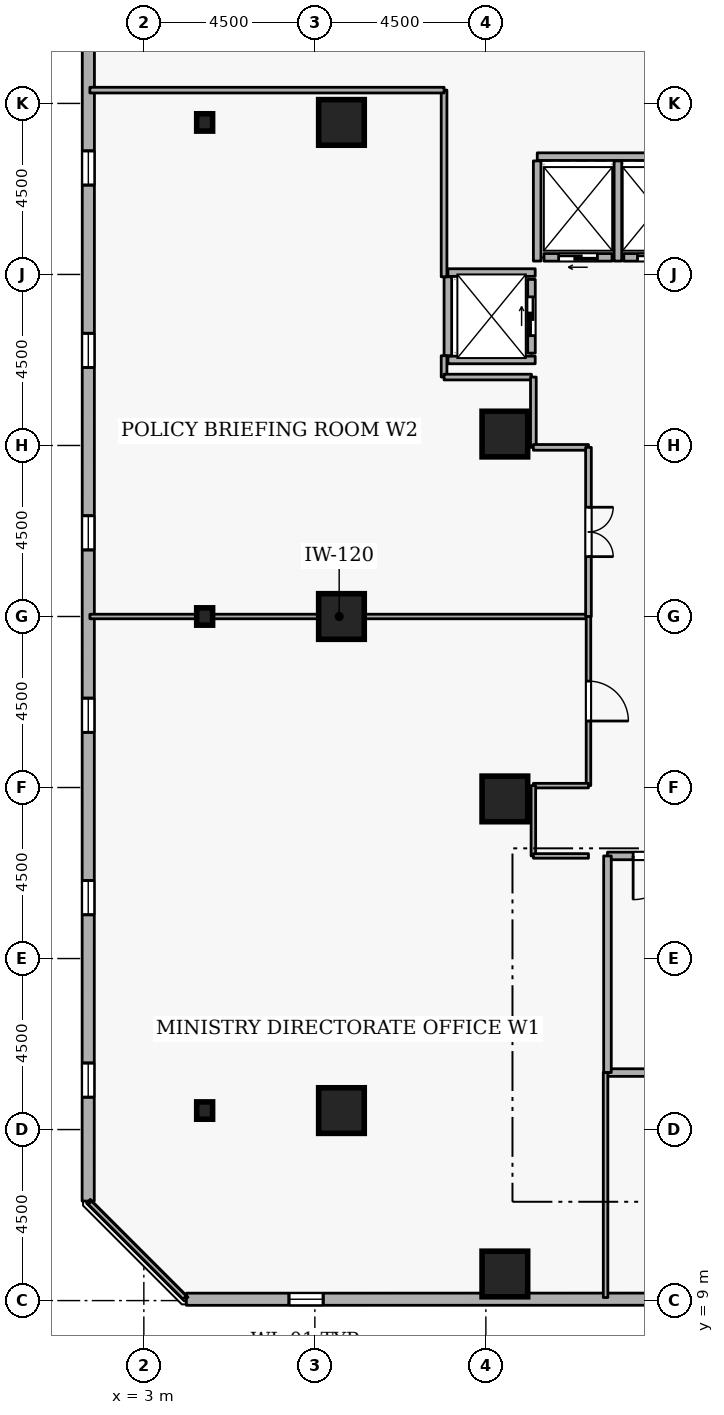
"""IFC4 building model, lengths in metres.
Left out: names, types, materials, properties, quantities, classifications, styles, units other than length and angle.
Written with IfcOpenShell. Run it as: python <this file> out.ifc"""

import sys

from ifc_helpers import new_model, si_unit, direction, frame, frame_2d, origin, origin_2d, place, context, subcontext, project, spatial, rectangle, i_section, extrude, element, fill, save


model = new_model("IFC4")
c1 = context("Model", 3, precision=1e-05, world=origin(), true_north=direction((0.0, 1.0)))
c2 = subcontext(c1, "Body", "Model", "MODEL_VIEW")
j1 = project(units=[si_unit("LENGTHUNIT", "METRE"), si_unit("PLANEANGLEUNIT", "RADIAN")], contexts=[c1])
p1 = place(None, origin())
s1 = spatial("IfcSite", under=j1, at=p1, CompositionType="ELEMENT")
p2 = place(p1, origin())
s2 = spatial("IfcBuilding", under=s1, at=p2, CompositionType="ELEMENT")
p3 = place(p2, frame((0.0, 0.0, 98.1)))
s3 = spatial("IfcBuildingStorey", under=s2, at=p3, CompositionType="ELEMENT", Elevation=98.1)
for number, where, z_axis, x_axis in (
    (1, (12.5, 9.7, 0.0), (0.0, 0.0, 1.0), (1.0, 0.0, 0.0)),
    (2, (8.2, 14.0, 0.0), (0.0, 0.0, 1.0), (1.0, 0.0, 0.0)),
    (3, (8.2, 27.0, 0.0), (0.0, 0.0, 1.0), (1.0, 0.0, 0.0)),
    (4, (8.2, 40.0, 0.0), (0.0, 0.0, 1.0), (1.0, 0.0, 0.0)),
    (5, (12.5, 22.2, 0.0), (0.0, 0.0, 1.0), (1.0, 0.0, 0.0)),
    (6, (12.5, 31.8, 0.0), (0.0, 0.0, 1.0), (1.0, 0.0, 0.0)),
):
    element("IfcColumn", number, at=place(p3, frame(where, z_axis=z_axis, x_axis=x_axis)), inside=s3, PredefinedType="COLUMN", context=c2, shape_type="SweptSolid", body=[
        extrude(rectangle(XDim=1.2, YDim=1.2, at=origin_2d()), origin(), (0.0, 0.0, 1.0), 3.6),
    ])
for number, where, z_axis, x_axis in (
    (7, (4.6, 14.0, 0.0), (0.0, 0.0, 1.0), (1.0, 0.0, 0.0)),
    (8, (4.6, 27.0, 0.0), (0.0, 0.0, 1.0), (1.0, 0.0, 0.0)),
    (9, (4.6, 40.0, 0.0), (0.0, 0.0, 1.0), (1.0, 0.0, 0.0)),
):
    element("IfcColumn", number, at=place(p3, frame(where, z_axis=z_axis, x_axis=x_axis)), inside=s3, PredefinedType="COLUMN", context=c2, shape_type="SweptSolid", body=[
        extrude(i_section(OverallWidth=0.418, OverallDepth=0.456, WebThickness=0.042, FlangeThickness=0.067, FilletRadius=0.015, at=origin_2d()), origin(), (0.0, 0.0, 1.0), 3.6),
    ])
p4 = place(p3, frame((4.119, 9.035, 0.0), z_axis=(0.0, 0.0, 1.0), x_axis=(0.999999989352, 0.000145929605, 0.0)))
e10 = element("IfcWall", 10, at=p4, inside=s3, PredefinedType="STANDARD", context=c2, shape_type="SweptSolid", body=[
    extrude(rectangle(XDim=35.133, YDim=0.32, at=frame_2d((17.566, 0.0))), origin(), (0.0, 0.0, 1.0), 2.7),
])
p5 = place(p4, frame((2.7, 0.0, 0.72)))
e11 = element("IfcOpeningElement", 11, at=p5, cuts=e10, PredefinedType="OPENING", context=c2, shape_type="SweptSolid", body=[
    extrude(rectangle(XDim=0.9, YDim=1.75, at=frame_2d((0.45, 0.875))), frame((0.0, 0.17, 0.0), z_axis=(0.0, -1.0, 0.0), x_axis=(1.0, 0.0, 0.0)), (0.0, 0.0, 1.0), 0.34),
])
p6 = place(p4, frame((12.3, 0.0, 0.72)))
e12 = element("IfcOpeningElement", 12, at=p6, cuts=e10, PredefinedType="OPENING", context=c2, shape_type="SweptSolid", body=[
    extrude(rectangle(XDim=0.9, YDim=1.75, at=frame_2d((0.45, 0.875))), frame((0.0, 0.17, 0.0), z_axis=(0.0, -1.0, 0.0), x_axis=(1.0, 0.0, 0.0)), (0.0, 0.0, 1.0), 0.34),
])
p7 = place(p4, frame((17.1, 0.0, 0.72)))
e13 = element("IfcOpeningElement", 13, at=p7, cuts=e10, PredefinedType="OPENING", context=c2, shape_type="SweptSolid", body=[
    extrude(rectangle(XDim=0.9, YDim=1.75, at=frame_2d((0.45, 0.875))), frame((0.0, 0.17, 0.0), z_axis=(0.0, -1.0, 0.0), x_axis=(1.0, 0.0, 0.0)), (0.0, 0.0, 1.0), 0.34),
])
p8 = place(p4, frame((26.7, 0.0, 0.72)))
e14 = element("IfcOpeningElement", 14, at=p8, cuts=e10, PredefinedType="OPENING", context=c2, shape_type="SweptSolid", body=[
    extrude(rectangle(XDim=0.9, YDim=1.75, at=frame_2d((0.45, 0.875))), frame((0.0, 0.17, 0.0), z_axis=(0.0, -1.0, 0.0), x_axis=(1.0, 0.0, 0.0)), (0.0, 0.0, 1.0), 0.34),
])
p9 = place(p4, frame((31.5, 0.0, 0.72)))
e15 = element("IfcOpeningElement", 15, at=p9, cuts=e10, PredefinedType="OPENING", context=c2, shape_type="SweptSolid", body=[
    extrude(rectangle(XDim=0.9, YDim=1.75, at=frame_2d((0.45, 0.875))), frame((0.0, 0.17, 0.0), z_axis=(0.0, -1.0, 0.0), x_axis=(1.0, 0.0, 0.0)), (0.0, 0.0, 1.0), 0.34),
])
p10 = place(p3, frame((1.541, 46.752, 0.0), z_axis=(0.0, 0.0, 1.0), x_axis=(-0.000145929605, -0.999999989352, 0.0)))
e16 = element("IfcWall", 16, at=p10, inside=s3, PredefinedType="STANDARD", context=c2, shape_type="SweptSolid", body=[
    extrude(rectangle(XDim=35.133, YDim=0.32, at=frame_2d((17.566, 0.0))), origin(), (0.0, 0.0, 1.0), 2.7),
])
p11 = place(p10, frame((2.7, 0.0, 0.72)))
e17 = element("IfcOpeningElement", 17, at=p11, cuts=e16, PredefinedType="OPENING", context=c2, shape_type="SweptSolid", body=[
    extrude(rectangle(XDim=0.9, YDim=1.75, at=frame_2d((0.45, 0.875))), frame((0.0, 0.17, 0.0), z_axis=(0.0, -1.0, 0.0), x_axis=(1.0, 0.0, 0.0)), (0.0, 0.0, 1.0), 0.34),
])
p12 = place(p10, frame((7.5, 0.0, 0.72)))
e18 = element("IfcOpeningElement", 18, at=p12, cuts=e16, PredefinedType="OPENING", context=c2, shape_type="SweptSolid", body=[
    extrude(rectangle(XDim=0.9, YDim=1.75, at=frame_2d((0.45, 0.875))), frame((0.0, 0.17, 0.0), z_axis=(0.0, -1.0, 0.0), x_axis=(1.0, 0.0, 0.0)), (0.0, 0.0, 1.0), 0.34),
])
p13 = place(p10, frame((12.3, 0.0, 0.72)))
e19 = element("IfcOpeningElement", 19, at=p13, cuts=e16, PredefinedType="OPENING", context=c2, shape_type="SweptSolid", body=[
    extrude(rectangle(XDim=0.9, YDim=1.75, at=frame_2d((0.45, 0.875))), frame((0.0, 0.17, 0.0), z_axis=(0.0, -1.0, 0.0), x_axis=(1.0, 0.0, 0.0)), (0.0, 0.0, 1.0), 0.34),
])
p14 = place(p10, frame((17.1, 0.0, 0.72)))
e20 = element("IfcOpeningElement", 20, at=p14, cuts=e16, PredefinedType="OPENING", context=c2, shape_type="SweptSolid", body=[
    extrude(rectangle(XDim=0.9, YDim=1.75, at=frame_2d((0.45, 0.875))), frame((0.0, 0.17, 0.0), z_axis=(0.0, -1.0, 0.0), x_axis=(1.0, 0.0, 0.0)), (0.0, 0.0, 1.0), 0.34),
])
p15 = place(p10, frame((21.9, 0.0, 0.72)))
e21 = element("IfcOpeningElement", 21, at=p15, cuts=e16, PredefinedType="OPENING", context=c2, shape_type="SweptSolid", body=[
    extrude(rectangle(XDim=0.9, YDim=1.75, at=frame_2d((0.45, 0.875))), frame((0.0, 0.17, 0.0), z_axis=(0.0, -1.0, 0.0), x_axis=(1.0, 0.0, 0.0)), (0.0, 0.0, 1.0), 0.34),
])
p16 = place(p10, frame((26.7, 0.0, 0.72)))
e22 = element("IfcOpeningElement", 22, at=p16, cuts=e16, PredefinedType="OPENING", context=c2, shape_type="SweptSolid", body=[
    extrude(rectangle(XDim=0.9, YDim=1.75, at=frame_2d((0.45, 0.875))), frame((0.0, 0.17, 0.0), z_axis=(0.0, -1.0, 0.0), x_axis=(1.0, 0.0, 0.0)), (0.0, 0.0, 1.0), 0.34),
])
p17 = place(p10, frame((31.5, 0.0, 0.72)))
e23 = element("IfcOpeningElement", 23, at=p17, cuts=e16, PredefinedType="OPENING", context=c2, shape_type="SweptSolid", body=[
    extrude(rectangle(XDim=0.9, YDim=1.75, at=frame_2d((0.45, 0.875))), frame((0.0, 0.17, 0.0), z_axis=(0.0, -1.0, 0.0), x_axis=(1.0, 0.0, 0.0)), (0.0, 0.0, 1.0), 0.34),
])
p18 = place(p3, frame((17.37, 36.45, 0.0), z_axis=(0.0, 0.0, 1.0), x_axis=(-1.0, 0.0, 0.0)))
e24 = element("IfcWall", 24, at=p18, inside=s3, PredefinedType="STANDARD", context=c2, shape_type="SweptSolid", body=[
    extrude(rectangle(XDim=1.74, YDim=0.2, at=frame_2d((0.87, 0.0))), origin(), (0.0, 0.0, 1.0), 3.3),
])
p19 = place(p18, frame((0.36, 0.0, 0.0)))
e25 = element("IfcOpeningElement", 25, at=p19, cuts=e24, PredefinedType="OPENING", context=c2, shape_type="SweptSolid", body=[
    extrude(rectangle(XDim=1.02, YDim=2.06, at=frame_2d((0.51, 1.03))), frame((0.0, 0.11, 0.0), z_axis=(0.0, -1.0, 0.0), x_axis=(1.0, 0.0, 0.0)), (0.0, 0.0, 1.0), 0.22),
])
p20 = place(p3, frame((15.32, 36.45, 0.0), z_axis=(0.0, 0.0, 1.0), x_axis=(-1.0, 0.0, 0.0)))
e26 = element("IfcWall", 26, at=p20, inside=s3, PredefinedType="STANDARD", context=c2, shape_type="SweptSolid", body=[
    extrude(rectangle(XDim=1.79, YDim=0.2, at=frame_2d((0.895, 0.0))), origin(), (0.0, 0.0, 1.0), 3.3),
])
p21 = place(p20, frame((0.385, 0.0, 0.0)))
e27 = element("IfcOpeningElement", 27, at=p21, cuts=e26, PredefinedType="OPENING", context=c2, shape_type="SweptSolid", body=[
    extrude(rectangle(XDim=1.02, YDim=2.06, at=frame_2d((0.51, 1.03))), frame((0.0, 0.11, 0.0), z_axis=(0.0, -1.0, 0.0), x_axis=(1.0, 0.0, 0.0)), (0.0, 0.0, 1.0), 0.22),
])
p22 = place(p3, frame((13.2, 33.93, 0.0), z_axis=(0.0, 0.0, 1.0), x_axis=(0.0, 1.0, 0.0)))
e28 = element("IfcWall", 28, at=p22, inside=s3, PredefinedType="STANDARD", context=c2, shape_type="SweptSolid", body=[
    extrude(rectangle(XDim=1.94, YDim=0.2, at=frame_2d((0.97, 0.0))), origin(), (0.0, 0.0, 1.0), 3.3),
])
p23 = place(p22, frame((0.46, 0.0, 0.0)))
e29 = element("IfcOpeningElement", 29, at=p23, cuts=e28, PredefinedType="OPENING", context=c2, shape_type="SweptSolid", body=[
    extrude(rectangle(XDim=1.02, YDim=2.06, at=frame_2d((0.51, 1.03))), frame((0.0, 0.11, 0.0), z_axis=(0.0, -1.0, 0.0), x_axis=(1.0, 0.0, 0.0)), (0.0, 0.0, 1.0), 0.22),
])
p24 = place(p3, frame((13.352, 39.1, 0.0), z_axis=(0.0, 0.0, 1.0), x_axis=(1.0, 0.0, 0.0)))
e30 = element("IfcWall", 30, at=p24, inside=s3, PredefinedType="STANDARD", context=c2, shape_type="SweptSolid", body=[
    extrude(rectangle(XDim=4.196, YDim=0.2, at=frame_2d((2.098, 0.0))), origin(), (0.0, 0.0, 1.0), 3.3),
])
for number, where, z_axis, x_axis in (
    (31, (15.475, 36.352, 0.0), (0.0, 0.0, 1.0), (0.0, 1.0, 0.0)),
    (32, (13.35, 36.352, 0.0), (0.0, 0.0, 1.0), (0.0, 1.0, 0.0)),
):
    element("IfcWall", number, at=place(p3, frame(where, z_axis=z_axis, x_axis=x_axis)), inside=s3, PredefinedType="STANDARD", context=c2, shape_type="SweptSolid", body=[
        extrude(rectangle(XDim=2.636, YDim=0.2, at=frame_2d((1.318, 0.0))), origin(), (0.0, 0.0, 1.0), 3.3),
    ])
for number, where, z_axis, x_axis in (
    (33, (11.002, 36.05, 0.0), (0.0, 0.0, 1.0), (1.0, 0.0, 0.0)),
    (34, (11.002, 33.75, 0.0), (0.0, 0.0, 1.0), (1.0, 0.0, 0.0)),
):
    element("IfcWall", number, at=place(p3, frame(where, z_axis=z_axis, x_axis=x_axis)), inside=s3, PredefinedType="STANDARD", context=c2, shape_type="SweptSolid", body=[
        extrude(rectangle(XDim=2.296, YDim=0.2, at=frame_2d((1.148, 0.0))), origin(), (0.0, 0.0, 1.0), 3.3),
    ])
p25 = place(p3, frame((11.0, 33.862, 0.0), z_axis=(0.0, 0.0, 1.0), x_axis=(0.0, 1.0, 0.0)))
e35 = element("IfcWall", 35, at=p25, inside=s3, PredefinedType="STANDARD", context=c2, shape_type="SweptSolid", body=[
    extrude(rectangle(XDim=2.076, YDim=0.2, at=frame_2d((1.038, 0.0))), origin(), (0.0, 0.0, 1.0), 3.3),
])
p26 = place(p3, frame((15.2, 15.0, 0.0), z_axis=(0.0, 0.0, 1.0), x_axis=(1.0, 0.0, 0.0)))
e36 = element("IfcWall", 36, at=p26, inside=s3, PredefinedType="STANDARD", context=c2, shape_type="SweptSolid", body=[
    extrude(rectangle(XDim=2.5, YDim=0.2, at=frame_2d((1.25, 0.0))), origin(), (0.0, 0.0, 1.0), 3.3),
])
p27 = place(p3, frame((17.7, 20.7, 0.0), z_axis=(0.0, 0.0, 1.0), x_axis=(-1.0, 0.0, 0.0)))
e37 = element("IfcWall", 37, at=p27, inside=s3, PredefinedType="STANDARD", context=c2, shape_type="SweptSolid", body=[
    extrude(rectangle(XDim=2.5, YDim=0.2, at=frame_2d((1.25, 0.0))), origin(), (0.0, 0.0, 1.0), 3.3),
])
p28 = place(p27, frame((0.675, 0.0, 0.0)))
e38 = element("IfcOpeningElement", 38, at=p28, cuts=e37, PredefinedType="OPENING", context=c2, shape_type="SweptSolid", body=[
    extrude(rectangle(XDim=1.15, YDim=2.1, at=frame_2d((0.575, 1.05))), frame((0.0, 0.11, 0.0), z_axis=(0.0, -1.0, 0.0), x_axis=(1.0, 0.0, 0.0)), (0.0, 0.0, 1.0), 0.22),
])
p29 = place(p3, frame((15.2, 20.7, 0.0), z_axis=(0.0, 0.0, 1.0), x_axis=(0.0, -1.0, 0.0)))
e39 = element("IfcWall", 39, at=p29, inside=s3, PredefinedType="STANDARD", context=c2, shape_type="SweptSolid", body=[
    extrude(rectangle(XDim=5.7, YDim=0.2, at=frame_2d((2.85, 0.0))), origin(), (0.0, 0.0, 1.0), 3.3),
])
p30 = place(p3, frame((1.58, 27.0, 0.0), z_axis=(0.0, 0.0, 1.0), x_axis=(1.0, 0.0, 0.0)))
e40 = element("IfcWall", 40, at=p30, inside=s3, PredefinedType="PARTITIONING", context=c2, shape_type="SweptSolid", body=[
    extrude(rectangle(XDim=13.12, YDim=0.12, at=frame_2d((6.56, 0.0))), origin(), (0.0, 0.0, 1.0), 2.838),
])
p31 = place(p3, frame((14.7, 27.0, 0.0), z_axis=(0.0, 0.0, 1.0), x_axis=(0.0, -1.0, 0.0)))
e41 = element("IfcWall", 41, at=p31, inside=s3, PredefinedType="PARTITIONING", context=c2, shape_type="SweptSolid", body=[
    extrude(rectangle(XDim=4.45, YDim=0.12, at=frame_2d((2.225, 0.0))), origin(), (0.0, 0.0, 1.0), 3.3),
])
p32 = place(p31, frame((1.7, 0.0, 0.0)))
e42 = element("IfcOpeningElement", 42, at=p32, cuts=e41, PredefinedType="OPENING", context=c2, shape_type="SweptSolid", body=[
    extrude(rectangle(XDim=1.05, YDim=2.1, at=frame_2d((0.525, 1.05))), frame((0.0, 0.07, 0.0), z_axis=(0.0, -1.0, 0.0), x_axis=(1.0, 0.0, 0.0)), (0.0, 0.0, 1.0), 0.14),
])
p33 = place(p3, frame((14.7, 22.55, 0.0), z_axis=(0.0, 0.0, 1.0), x_axis=(-1.0, 0.0, 0.0)))
e43 = element("IfcWall", 43, at=p33, inside=s3, PredefinedType="PARTITIONING", context=c2, shape_type="SweptSolid", body=[
    extrude(rectangle(XDim=1.45, YDim=0.12, at=frame_2d((0.725, 0.0))), origin(), (0.0, 0.0, 1.0), 3.3),
])
p34 = place(p3, frame((13.25, 22.55, 0.0), z_axis=(0.0, 0.0, 1.0), x_axis=(0.0, -1.0, 0.0)))
e44 = element("IfcWall", 44, at=p34, inside=s3, PredefinedType="PARTITIONING", context=c2, shape_type="SweptSolid", body=[
    extrude(rectangle(XDim=1.85, YDim=0.12, at=frame_2d((0.925, 0.0))), origin(), (0.0, 0.0, 1.0), 3.3),
])
p35 = place(p3, frame((13.25, 20.7, 0.0), z_axis=(0.0, 0.0, 1.0), x_axis=(1.0, 0.0, 0.0)))
e45 = element("IfcWall", 45, at=p35, inside=s3, PredefinedType="PARTITIONING", context=c2, shape_type="SweptSolid", body=[
    extrude(rectangle(XDim=1.45, YDim=0.12, at=frame_2d((0.725, 0.0))), origin(), (0.0, 0.0, 1.0), 3.3),
])
p36 = place(p3, frame((15.15, 15.0, 0.0), z_axis=(0.0, 0.0, 1.0), x_axis=(0.0, -1.0, 0.0)))
e46 = element("IfcWall", 46, at=p36, inside=s3, PredefinedType="PARTITIONING", context=c2, shape_type="SweptSolid", body=[
    extrude(rectangle(XDim=5.92, YDim=0.12, at=frame_2d((2.96, 0.0))), origin(), (0.0, 0.0, 1.0), 3.3),
])
p37 = place(p3, frame((4.075, 9.08, 0.0), z_axis=(0.0, 0.0, 1.0), x_axis=(-0.707106781187, 0.707106781187, 0.0)))
e47 = element("IfcWall", 47, at=p37, inside=s3, PredefinedType="PARTITIONING", context=c2, shape_type="SweptSolid", body=[
    extrude(rectangle(XDim=3.528, YDim=0.12, at=frame_2d((1.764, 0.0))), origin(), (0.0, 0.0, 1.0), 3.3),
])
p38 = place(p3, frame((10.9, 40.85, 0.0), z_axis=(0.0, 0.0, 1.0), x_axis=(0.0, -1.0, 0.0)))
e48 = element("IfcWall", 48, at=p38, inside=s3, PredefinedType="PARTITIONING", context=c2, shape_type="SweptSolid", body=[
    extrude(rectangle(XDim=4.912, YDim=0.15, at=frame_2d((2.456, 0.0))), origin(), (0.0, 0.0, 1.0), 3.3),
])
p39 = place(p3, frame((10.9, 33.862, 0.0), z_axis=(0.0, 0.0, 1.0), x_axis=(0.0, -1.0, 0.0)))
e49 = element("IfcWall", 49, at=p39, inside=s3, PredefinedType="PARTITIONING", context=c2, shape_type="SweptSolid", body=[
    extrude(rectangle(XDim=0.562, YDim=0.15, at=frame_2d((0.281, 0.0))), origin(), (0.0, 0.0, 1.0), 3.3),
])
p40 = place(p3, frame((10.9, 33.3, 0.0), z_axis=(0.0, 0.0, 1.0), x_axis=(1.0, 0.0, 0.0)))
e50 = element("IfcWall", 50, at=p40, inside=s3, PredefinedType="PARTITIONING", context=c2, shape_type="SweptSolid", body=[
    extrude(rectangle(XDim=2.3, YDim=0.15, at=frame_2d((1.15, 0.0))), origin(), (0.0, 0.0, 1.0), 3.3),
])
p41 = place(p3, frame((13.25, 33.3, 0.0), z_axis=(0.0, 0.0, 1.0), x_axis=(0.0, -1.0, 0.0)))
e51 = element("IfcWall", 51, at=p41, inside=s3, PredefinedType="PARTITIONING", context=c2, shape_type="SweptSolid", body=[
    extrude(rectangle(XDim=1.85, YDim=0.15, at=frame_2d((0.925, 0.0))), origin(), (0.0, 0.0, 1.0), 3.3),
])
p42 = place(p3, frame((13.25, 31.45, 0.0), z_axis=(0.0, 0.0, 1.0), x_axis=(1.0, 0.0, 0.0)))
e52 = element("IfcWall", 52, at=p42, inside=s3, PredefinedType="PARTITIONING", context=c2, shape_type="SweptSolid", body=[
    extrude(rectangle(XDim=1.45, YDim=0.15, at=frame_2d((0.725, 0.0))), origin(), (0.0, 0.0, 1.0), 3.3),
])
p43 = place(p3, frame((14.7, 31.45, 0.0), z_axis=(0.0, 0.0, 1.0), x_axis=(0.0, -1.0, 0.0)))
e53 = element("IfcWall", 53, at=p43, inside=s3, PredefinedType="PARTITIONING", context=c2, shape_type="SweptSolid", body=[
    extrude(rectangle(XDim=4.45, YDim=0.15, at=frame_2d((2.225, 0.0))), origin(), (0.0, 0.0, 1.0), 3.3),
])
p44 = place(p43, frame((1.575, 0.0, 0.0)))
e54 = element("IfcOpeningElement", 54, at=p44, cuts=e53, PredefinedType="OPENING", context=c2, shape_type="SweptSolid", body=[
    extrude(rectangle(XDim=1.3, YDim=2.12, at=frame_2d((0.65, 1.06))), frame((0.0, 0.085, 0.0), z_axis=(0.0, -1.0, 0.0), x_axis=(1.0, 0.0, 0.0)), (0.0, 0.0, 1.0), 0.17),
])
p45 = place(p3, frame((1.58, 40.85, 0.0), z_axis=(0.0, 0.0, 1.0), x_axis=(1.0, 0.0, 0.0)))
e55 = element("IfcWall", 55, at=p45, inside=s3, PredefinedType="PARTITIONING", context=c2, shape_type="SweptSolid", body=[
    extrude(rectangle(XDim=9.32, YDim=0.15, at=frame_2d((4.66, 0.0))), origin(), (0.0, 0.0, 1.0), 3.3),
])
p46 = place(p5, origin())
e56 = element("IfcWindow", 56, at=p46, inside=s3, PartitioningType="SINGLE_PANEL", PredefinedType="WINDOW", context=c2, shape_type="SweptSolid", body=[
    extrude(rectangle(XDim=0.9, YDim=1.75, at=frame_2d((0.45, 0.875))), frame((0.0, 0.03, 0.0), z_axis=(0.0, -1.0, 0.0), x_axis=(1.0, 0.0, 0.0)), (0.0, 0.0, 1.0), 0.06),
])
fill(e11, e56)
p47 = place(p12, origin())
e57 = element("IfcWindow", 57, at=p47, inside=s3, PartitioningType="SINGLE_PANEL", PredefinedType="WINDOW", context=c2, shape_type="SweptSolid", body=[
    extrude(rectangle(XDim=0.9, YDim=1.75, at=frame_2d((0.45, 0.875))), frame((0.0, 0.03, 0.0), z_axis=(0.0, -1.0, 0.0), x_axis=(1.0, 0.0, 0.0)), (0.0, 0.0, 1.0), 0.06),
])
fill(e18, e57)
p48 = place(p13, origin())
e58 = element("IfcWindow", 58, at=p48, inside=s3, PartitioningType="SINGLE_PANEL", PredefinedType="WINDOW", context=c2, shape_type="SweptSolid", body=[
    extrude(rectangle(XDim=0.9, YDim=1.75, at=frame_2d((0.45, 0.875))), frame((0.0, 0.03, 0.0), z_axis=(0.0, -1.0, 0.0), x_axis=(1.0, 0.0, 0.0)), (0.0, 0.0, 1.0), 0.06),
])
fill(e19, e58)
p49 = place(p14, origin())
e59 = element("IfcWindow", 59, at=p49, inside=s3, PartitioningType="SINGLE_PANEL", PredefinedType="WINDOW", context=c2, shape_type="SweptSolid", body=[
    extrude(rectangle(XDim=0.9, YDim=1.75, at=frame_2d((0.45, 0.875))), frame((0.0, 0.03, 0.0), z_axis=(0.0, -1.0, 0.0), x_axis=(1.0, 0.0, 0.0)), (0.0, 0.0, 1.0), 0.06),
])
fill(e20, e59)
p50 = place(p15, origin())
e60 = element("IfcWindow", 60, at=p50, inside=s3, PartitioningType="SINGLE_PANEL", PredefinedType="WINDOW", context=c2, shape_type="SweptSolid", body=[
    extrude(rectangle(XDim=0.9, YDim=1.75, at=frame_2d((0.45, 0.875))), frame((0.0, 0.03, 0.0), z_axis=(0.0, -1.0, 0.0), x_axis=(1.0, 0.0, 0.0)), (0.0, 0.0, 1.0), 0.06),
])
fill(e21, e60)
p51 = place(p16, origin())
e61 = element("IfcWindow", 61, at=p51, inside=s3, PartitioningType="SINGLE_PANEL", PredefinedType="WINDOW", context=c2, shape_type="SweptSolid", body=[
    extrude(rectangle(XDim=0.9, YDim=1.75, at=frame_2d((0.45, 0.875))), frame((0.0, 0.03, 0.0), z_axis=(0.0, -1.0, 0.0), x_axis=(1.0, 0.0, 0.0)), (0.0, 0.0, 1.0), 0.06),
])
fill(e22, e61)
p52 = place(p17, origin())
e62 = element("IfcWindow", 62, at=p52, inside=s3, PartitioningType="SINGLE_PANEL", PredefinedType="WINDOW", context=c2, shape_type="SweptSolid", body=[
    extrude(rectangle(XDim=0.9, YDim=1.75, at=frame_2d((0.45, 0.875))), frame((0.0, 0.03, 0.0), z_axis=(0.0, -1.0, 0.0), x_axis=(1.0, 0.0, 0.0)), (0.0, 0.0, 1.0), 0.06),
])
fill(e23, e62)
p53 = place(p19, origin())
e63 = element("IfcDoor", 63, at=p53, inside=s3, OperationType="SLIDING_TO_LEFT", PredefinedType="DOOR", context=c2, shape_type="SweptSolid", body=[
    extrude(rectangle(XDim=1.02, YDim=2.06, at=frame_2d((0.51, 1.03))), frame((0.0, 0.025, 0.0), z_axis=(0.0, -1.0, 0.0), x_axis=(1.0, 0.0, 0.0)), (0.0, 0.0, 1.0), 0.05),
])
fill(e25, e63)
p54 = place(p21, origin())
e64 = element("IfcDoor", 64, at=p54, inside=s3, OperationType="SLIDING_TO_LEFT", PredefinedType="DOOR", context=c2, shape_type="SweptSolid", body=[
    extrude(rectangle(XDim=1.02, YDim=2.06, at=frame_2d((0.51, 1.03))), frame((0.0, 0.025, 0.0), z_axis=(0.0, -1.0, 0.0), x_axis=(1.0, 0.0, 0.0)), (0.0, 0.0, 1.0), 0.05),
])
fill(e27, e64)
p55 = place(p23, origin())
e65 = element("IfcDoor", 65, at=p55, inside=s3, OperationType="SLIDING_TO_LEFT", PredefinedType="DOOR", context=c2, shape_type="SweptSolid", body=[
    extrude(rectangle(XDim=1.02, YDim=2.06, at=frame_2d((0.51, 1.03))), frame((0.0, 0.025, 0.0), z_axis=(0.0, -1.0, 0.0), x_axis=(1.0, 0.0, 0.0)), (0.0, 0.0, 1.0), 0.05),
])
fill(e29, e65)
p56 = place(p28, origin())
e66 = element("IfcDoor", 66, at=p56, inside=s3, OperationType="SINGLE_SWING_RIGHT", PredefinedType="DOOR", context=c2, shape_type="SweptSolid", body=[
    extrude(rectangle(XDim=1.15, YDim=2.1, at=frame_2d((0.575, 1.05))), frame((0.0, 0.025, 0.0), z_axis=(0.0, -1.0, 0.0), x_axis=(1.0, 0.0, 0.0)), (0.0, 0.0, 1.0), 0.05),
])
fill(e38, e66)
p57 = place(p32, origin())
e67 = element("IfcDoor", 67, at=p57, inside=s3, OperationType="SINGLE_SWING_RIGHT", PredefinedType="DOOR", context=c2, shape_type="SweptSolid", body=[
    extrude(rectangle(XDim=1.05, YDim=2.1, at=frame_2d((0.525, 1.05))), frame((0.0, 0.025, 0.0), z_axis=(0.0, -1.0, 0.0), x_axis=(1.0, 0.0, 0.0)), (0.0, 0.0, 1.0), 0.05),
])
fill(e42, e67)
p58 = place(p44, origin())
e68 = element("IfcDoor", 68, at=p58, inside=s3, OperationType="DOUBLE_DOOR_SINGLE_SWING", PredefinedType="DOOR", context=c2, shape_type="SweptSolid", body=[
    extrude(rectangle(XDim=1.3, YDim=2.12, at=frame_2d((0.65, 1.06))), frame((0.0, 0.025, 0.0), z_axis=(0.0, -1.0, 0.0), x_axis=(1.0, 0.0, 0.0)), (0.0, 0.0, 1.0), 0.05),
])
fill(e54, e68)
save(model, sys.argv[1])
